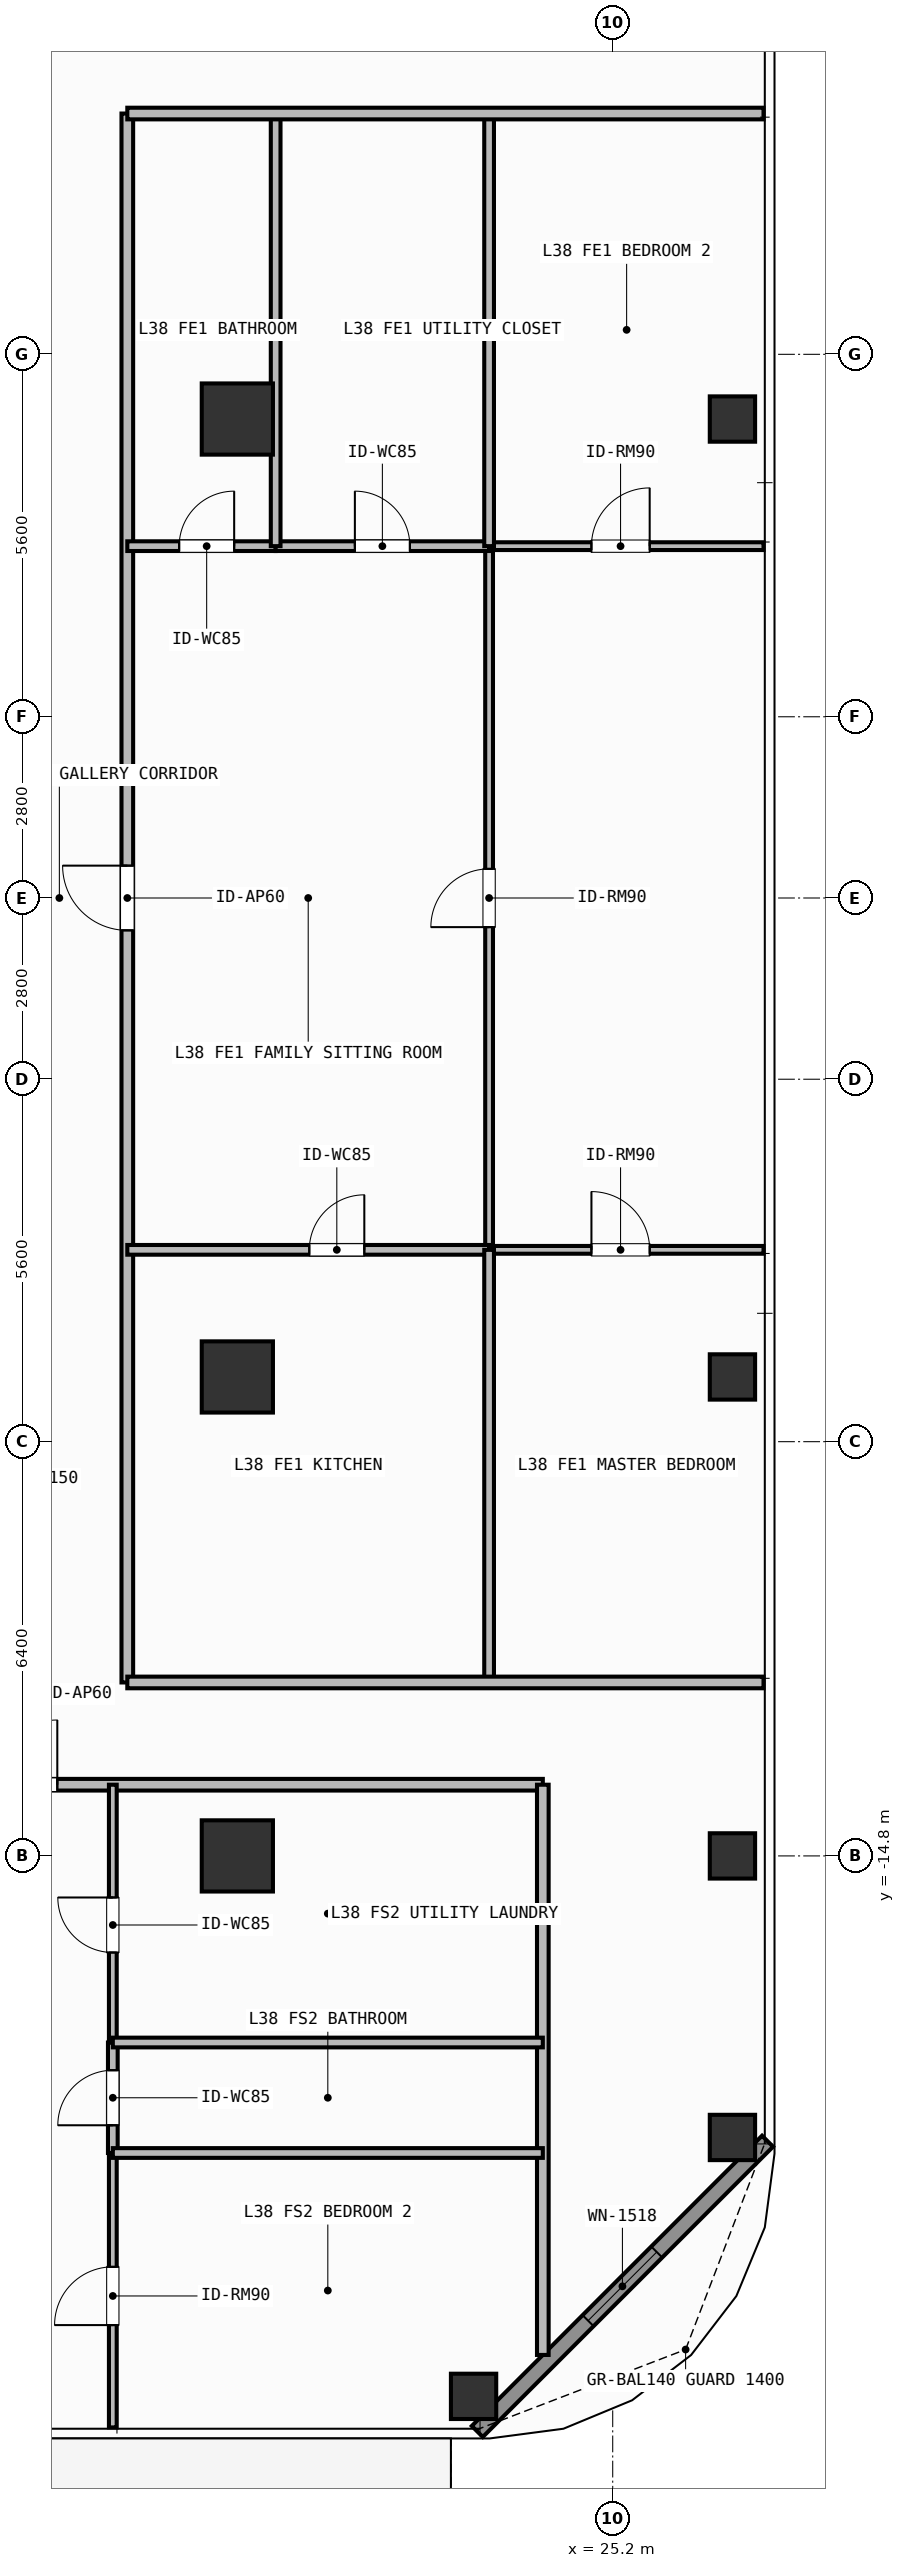
"""IFC4 building model, lengths in metres.
Left out: names, types, materials, properties, quantities, classifications, styles, units other than length and angle.
Written with IfcOpenShell. Run it as: python <this file> out.ifc"""

import sys

from ifc_helpers import new_model, si_unit, direction, frame, frame_2d, origin, origin_2d, place, context, subcontext, project, spatial, rectangle, hollow_rectangle, extrude, element, fill, save


model = new_model("IFC4")
c1 = context("Model", 3, precision=1e-05, world=origin(), true_north=direction((0.0, 1.0)))
c2 = subcontext(c1, "Body", "Model", "MODEL_VIEW")
j1 = project(units=[si_unit("LENGTHUNIT", "METRE"), si_unit("PLANEANGLEUNIT", "RADIAN")], contexts=[c1])
p1 = place(None, origin())
s1 = spatial("IfcSite", under=j1, at=p1, CompositionType="ELEMENT")
p2 = place(p1, origin())
s2 = spatial("IfcBuilding", under=s1, at=p2, CompositionType="ELEMENT")
p3 = place(p2, frame((0.0, 0.0, 152.4)))
s3 = spatial("IfcBuildingStorey", under=s2, at=p3, CompositionType="ELEMENT", Elevation=152.4)
for number, where, z_axis, x_axis in (
    (1, (19.4, -14.8, 0.0), (0.0, 0.0, 1.0), (1.0, 0.0, 0.0)),
    (2, (19.4, -7.4, 0.0), (0.0, 0.0, 1.0), (1.0, 0.0, 0.0)),
    (3, (19.4, 7.4, 0.0), (0.0, 0.0, 1.0), (1.0, 0.0, 0.0)),
):
    element("IfcColumn", number, at=place(p3, frame(where, z_axis=z_axis, x_axis=x_axis)), inside=s3, PredefinedType="COLUMN", context=c2, shape_type="SweptSolid", body=[
        extrude(rectangle(XDim=1.1, YDim=1.1, at=origin_2d()), origin(), (0.0, 0.0, 1.0), 3.9),
    ])
for number, where, z_axis, x_axis in (
    (4, (23.05, -23.15, 0.0), (0.0, 0.0, 1.0), (1.0, 0.0, 0.0)),
    (5, (27.05, -19.15, 0.0), (0.0, 0.0, 1.0), (1.0, 0.0, 0.0)),
    (6, (27.05, -14.8, 0.0), (0.0, 0.0, 1.0), (1.0, 0.0, 0.0)),
    (7, (27.05, -7.4, 0.0), (0.0, 0.0, 1.0), (1.0, 0.0, 0.0)),
    (8, (27.05, 7.4, 0.0), (0.0, 0.0, 1.0), (1.0, 0.0, 0.0)),
):
    element("IfcColumn", number, at=place(p3, frame(where, z_axis=z_axis, x_axis=x_axis)), inside=s3, PredefinedType="COLUMN", context=c2, shape_type="SweptSolid", body=[
        extrude(hollow_rectangle(XDim=0.7, YDim=0.7, WallThickness=0.032, at=origin_2d()), origin(), (0.0, 0.0, 1.0), 3.9),
    ])
p4 = place(p3, frame((27.592, -19.208, 0.0), z_axis=(0.0, 0.0, 1.0), x_axis=(-0.707087534163, -0.707126027686, 0.0)))
e9 = element("IfcWall", 9, at=p4, inside=s3, PredefinedType="SOLIDWALL", context=c2, shape_type="SweptSolid", body=[
    extrude(rectangle(XDim=6.342, YDim=0.24, at=frame_2d((3.171, 0.0))), origin(), (0.0, 0.0, 1.0), 3.6),
])
p5 = place(p4, frame((2.421, 0.0, 0.8)))
e10 = element("IfcOpeningElement", 10, at=p5, cuts=e9, PredefinedType="OPENING", context=c2, shape_type="SweptSolid", body=[
    extrude(rectangle(XDim=1.5, YDim=1.85, at=frame_2d((0.75, 0.925))), frame((0.0, 0.13, 0.0), z_axis=(0.0, -1.0, 0.0), x_axis=(1.0, 0.0, 0.0)), (0.0, 0.0, 1.0), 0.26),
])
p6 = place(p3, frame((6.326, -13.7, 0.0), z_axis=(0.0, 0.0, 1.0), x_axis=(1.0, 0.0, 0.0)))
e11 = element("IfcWall", 11, at=p6, inside=s3, PredefinedType="PARTITIONING", context=c2, shape_type="SweptSolid", body=[
    extrude(rectangle(XDim=17.794, YDim=0.18, at=frame_2d((8.897, 0.0))), origin(), (0.0, 0.0, 1.0), 3.6),
])
p7 = place(p6, frame((9.292, 0.0, 0.0)))
e12 = element("IfcOpeningElement", 12, at=p7, cuts=e11, PredefinedType="OPENING", context=c2, shape_type="SweptSolid", body=[
    extrude(rectangle(XDim=1.0, YDim=2.2, at=frame_2d((0.5, 1.1))), frame((0.0, 0.1, 0.0), z_axis=(0.0, -1.0, 0.0), x_axis=(1.0, 0.0, 0.0)), (0.0, 0.0, 1.0), 0.2),
])
p8 = place(p3, frame((17.476, -19.39, 0.0), z_axis=(0.0, 0.0, 1.0), x_axis=(0.0, 1.0, 0.0)))
e13 = element("IfcWall", 13, at=p8, inside=s3, PredefinedType="PARTITIONING", context=c2, shape_type="SweptSolid", body=[
    extrude(rectangle(XDim=1.707, YDim=0.15, at=frame_2d((0.854, 0.0))), origin(), (0.0, 0.0, 1.0), 3.6),
])
p9 = place(p8, frame((0.428, 0.0, 0.0)))
e14 = element("IfcOpeningElement", 14, at=p9, cuts=e13, PredefinedType="OPENING", context=c2, shape_type="SweptSolid", body=[
    extrude(rectangle(XDim=0.85, YDim=2.1, at=frame_2d((0.425, 1.05))), frame((0.0, 0.085, 0.0), z_axis=(0.0, -1.0, 0.0), x_axis=(1.0, 0.0, 0.0)), (0.0, 0.0, 1.0), 0.17),
])
p10 = place(p3, frame((17.476, -17.683, 0.0), z_axis=(0.0, 0.0, 1.0), x_axis=(0.0, 1.0, 0.0)))
e15 = element("IfcWall", 15, at=p10, inside=s3, PredefinedType="PARTITIONING", context=c2, shape_type="SweptSolid", body=[
    extrude(rectangle(XDim=3.983, YDim=0.12, at=frame_2d((1.992, 0.0))), origin(), (0.0, 0.0, 1.0), 3.6),
])
p11 = place(p10, frame((1.391, 0.0, 0.0)))
e16 = element("IfcOpeningElement", 16, at=p11, cuts=e15, PredefinedType="OPENING", context=c2, shape_type="SweptSolid", body=[
    extrude(rectangle(XDim=0.85, YDim=2.1, at=frame_2d((0.425, 1.05))), frame((0.0, 0.07, 0.0), z_axis=(0.0, -1.0, 0.0), x_axis=(1.0, 0.0, 0.0)), (0.0, 0.0, 1.0), 0.14),
])
p12 = place(p3, frame((17.476, -23.63, 0.0), z_axis=(0.0, 0.0, 1.0), x_axis=(0.0, 1.0, 0.0)))
e17 = element("IfcWall", 17, at=p12, inside=s3, PredefinedType="PARTITIONING", context=c2, shape_type="SweptSolid", body=[
    extrude(rectangle(XDim=4.24, YDim=0.12, at=frame_2d((2.12, 0.0))), origin(), (0.0, 0.0, 1.0), 3.6),
])
p13 = place(p12, frame((1.581, 0.0, 0.0)))
e18 = element("IfcOpeningElement", 18, at=p13, cuts=e17, PredefinedType="OPENING", context=c2, shape_type="SweptSolid", body=[
    extrude(rectangle(XDim=0.9, YDim=2.1, at=frame_2d((0.45, 1.05))), frame((0.0, 0.07, 0.0), z_axis=(0.0, -1.0, 0.0), x_axis=(1.0, 0.0, 0.0)), (0.0, 0.0, 1.0), 0.14),
])
p14 = place(p3, frame((17.7, -12.12, 0.0), z_axis=(0.0, 0.0, 1.0), x_axis=(0.0, 1.0, 0.0)))
e19 = element("IfcWall", 19, at=p14, inside=s3, PredefinedType="PARTITIONING", context=c2, shape_type="SweptSolid", body=[
    extrude(rectangle(XDim=24.24, YDim=0.18, at=frame_2d((12.12, 0.0))), origin(), (0.0, 0.0, 1.0), 3.6),
])
p15 = place(p14, frame((11.62, 0.0, 0.0)))
e20 = element("IfcOpeningElement", 20, at=p15, cuts=e19, PredefinedType="OPENING", context=c2, shape_type="SweptSolid", body=[
    extrude(rectangle(XDim=1.0, YDim=2.2, at=frame_2d((0.5, 1.1))), frame((0.0, 0.1, 0.0), z_axis=(0.0, -1.0, 0.0), x_axis=(1.0, 0.0, 0.0)), (0.0, 0.0, 1.0), 0.2),
])
p16 = place(p3, frame((23.29, -5.436, 0.0), z_axis=(0.0, 0.0, 1.0), x_axis=(0.0, 1.0, 0.0)))
e21 = element("IfcWall", 21, at=p16, inside=s3, PredefinedType="PARTITIONING", context=c2, shape_type="SweptSolid", body=[
    extrude(rectangle(XDim=10.872, YDim=0.12, at=frame_2d((5.436, 0.0))), origin(), (0.0, 0.0, 1.0), 3.6),
])
p17 = place(p16, frame((4.986, 0.0, 0.0)))
e22 = element("IfcOpeningElement", 22, at=p17, cuts=e21, PredefinedType="OPENING", context=c2, shape_type="SweptSolid", body=[
    extrude(rectangle(XDim=0.9, YDim=2.1, at=frame_2d((0.45, 1.05))), frame((0.0, 0.07, 0.0), z_axis=(0.0, -1.0, 0.0), x_axis=(1.0, 0.0, 0.0)), (0.0, 0.0, 1.0), 0.14),
])
p18 = place(p3, frame((17.7, 5.436, 0.0), z_axis=(0.0, 0.0, 1.0), x_axis=(1.0, 0.0, 0.0)))
e23 = element("IfcWall", 23, at=p18, inside=s3, PredefinedType="PARTITIONING", context=c2, shape_type="SweptSolid", body=[
    extrude(rectangle(XDim=2.292, YDim=0.15, at=frame_2d((1.146, 0.0))), origin(), (0.0, 0.0, 1.0), 3.6),
])
p19 = place(p18, frame((0.801, 0.0, 0.0)))
e24 = element("IfcOpeningElement", 24, at=p19, cuts=e23, PredefinedType="OPENING", context=c2, shape_type="SweptSolid", body=[
    extrude(rectangle(XDim=0.85, YDim=2.1, at=frame_2d((0.425, 1.05))), frame((0.0, 0.085, 0.0), z_axis=(0.0, -1.0, 0.0), x_axis=(1.0, 0.0, 0.0)), (0.0, 0.0, 1.0), 0.17),
])
p20 = place(p3, frame((19.992, 5.436, 0.0), z_axis=(0.0, 0.0, 1.0), x_axis=(1.0, 0.0, 0.0)))
e25 = element("IfcWall", 25, at=p20, inside=s3, PredefinedType="PARTITIONING", context=c2, shape_type="SweptSolid", body=[
    extrude(rectangle(XDim=3.298, YDim=0.15, at=frame_2d((1.649, 0.0))), origin(), (0.0, 0.0, 1.0), 3.6),
])
p21 = place(p20, frame((1.224, 0.0, 0.0)))
e26 = element("IfcOpeningElement", 26, at=p21, cuts=e25, PredefinedType="OPENING", context=c2, shape_type="SweptSolid", body=[
    extrude(rectangle(XDim=0.85, YDim=2.1, at=frame_2d((0.425, 1.05))), frame((0.0, 0.085, 0.0), z_axis=(0.0, -1.0, 0.0), x_axis=(1.0, 0.0, 0.0)), (0.0, 0.0, 1.0), 0.17),
])
p22 = place(p3, frame((17.7, -5.436, 0.0), z_axis=(0.0, 0.0, 1.0), x_axis=(1.0, 0.0, 0.0)))
e27 = element("IfcWall", 27, at=p22, inside=s3, PredefinedType="PARTITIONING", context=c2, shape_type="SweptSolid", body=[
    extrude(rectangle(XDim=5.59, YDim=0.15, at=frame_2d((2.795, 0.0))), origin(), (0.0, 0.0, 1.0), 3.6),
])
p23 = place(p22, frame((2.812, 0.0, 0.0)))
e28 = element("IfcOpeningElement", 28, at=p23, cuts=e27, PredefinedType="OPENING", context=c2, shape_type="SweptSolid", body=[
    extrude(rectangle(XDim=0.85, YDim=2.1, at=frame_2d((0.425, 1.05))), frame((0.0, 0.085, 0.0), z_axis=(0.0, -1.0, 0.0), x_axis=(1.0, 0.0, 0.0)), (0.0, 0.0, 1.0), 0.17),
])
p24 = place(p3, frame((23.29, -5.436, 0.0), z_axis=(0.0, 0.0, 1.0), x_axis=(1.0, 0.0, 0.0)))
e29 = element("IfcWall", 29, at=p24, inside=s3, PredefinedType="PARTITIONING", context=c2, shape_type="SweptSolid", body=[
    extrude(rectangle(XDim=4.24, YDim=0.12, at=frame_2d((2.12, 0.0))), origin(), (0.0, 0.0, 1.0), 3.6),
])
p25 = place(p24, frame((1.581, 0.0, 0.0)))
e30 = element("IfcOpeningElement", 30, at=p25, cuts=e29, PredefinedType="OPENING", context=c2, shape_type="SweptSolid", body=[
    extrude(rectangle(XDim=0.9, YDim=2.1, at=frame_2d((0.45, 1.05))), frame((0.0, 0.07, 0.0), z_axis=(0.0, -1.0, 0.0), x_axis=(1.0, 0.0, 0.0)), (0.0, 0.0, 1.0), 0.14),
])
p26 = place(p3, frame((23.29, 5.436, 0.0), z_axis=(0.0, 0.0, 1.0), x_axis=(1.0, 0.0, 0.0)))
e31 = element("IfcWall", 31, at=p26, inside=s3, PredefinedType="PARTITIONING", context=c2, shape_type="SweptSolid", body=[
    extrude(rectangle(XDim=4.24, YDim=0.12, at=frame_2d((2.12, 0.0))), origin(), (0.0, 0.0, 1.0), 3.6),
])
p27 = place(p26, frame((1.581, 0.0, 0.0)))
e32 = element("IfcOpeningElement", 32, at=p27, cuts=e31, PredefinedType="OPENING", context=c2, shape_type="SweptSolid", body=[
    extrude(rectangle(XDim=0.9, YDim=2.1, at=frame_2d((0.45, 1.05))), frame((0.0, 0.07, 0.0), z_axis=(0.0, -1.0, 0.0), x_axis=(1.0, 0.0, 0.0)), (0.0, 0.0, 1.0), 0.14),
])
p28 = place(p3, frame((24.12, -22.51, 0.0), z_axis=(0.0, 0.0, 1.0), x_axis=(0.0, 1.0, 0.0)))
e33 = element("IfcWall", 33, at=p28, inside=s3, PredefinedType="PARTITIONING", context=c2, shape_type="SweptSolid", body=[
    extrude(rectangle(XDim=8.81, YDim=0.18, at=frame_2d((4.405, 0.0))), origin(), (0.0, 0.0, 1.0), 3.6),
])
for number, where, z_axis, x_axis in (
    (34, (17.476, -17.683, 0.0), (0.0, 0.0, 1.0), (1.0, 0.0, 0.0)),
    (35, (17.476, -19.39, 0.0), (0.0, 0.0, 1.0), (1.0, 0.0, 0.0)),
):
    element("IfcWall", number, at=place(p3, frame(where, z_axis=z_axis, x_axis=x_axis)), inside=s3, PredefinedType="PARTITIONING", context=c2, shape_type="SweptSolid", body=[
        extrude(rectangle(XDim=6.644, YDim=0.15, at=frame_2d((3.322, 0.0))), origin(), (0.0, 0.0, 1.0), 3.6),
    ])
for number, where, z_axis, x_axis in (
    (36, (19.992, 5.436, 0.0), (0.0, 0.0, 1.0), (0.0, 1.0, 0.0)),
    (37, (23.29, -12.12, 0.0), (0.0, 0.0, 1.0), (0.0, 1.0, 0.0)),
    (38, (23.29, 5.436, 0.0), (0.0, 0.0, 1.0), (0.0, 1.0, 0.0)),
):
    element("IfcWall", number, at=place(p3, frame(where, z_axis=z_axis, x_axis=x_axis)), inside=s3, PredefinedType="PARTITIONING", context=c2, shape_type="SweptSolid", body=[
        extrude(rectangle(XDim=6.684, YDim=0.15, at=frame_2d((3.342, 0.0))), origin(), (0.0, 0.0, 1.0), 3.6),
    ])
for number, where, z_axis, x_axis in (
    (39, (17.7, -12.12, 0.0), (0.0, 0.0, 1.0), (1.0, 0.0, 0.0)),
    (40, (17.7, 12.12, 0.0), (0.0, 0.0, 1.0), (1.0, 0.0, 0.0)),
):
    element("IfcWall", number, at=place(p3, frame(where, z_axis=z_axis, x_axis=x_axis)), inside=s3, PredefinedType="PARTITIONING", context=c2, shape_type="SweptSolid", body=[
        extrude(rectangle(XDim=9.83, YDim=0.18, at=frame_2d((4.915, 0.0))), origin(), (0.0, 0.0, 1.0), 3.6),
    ])
p29 = place(p5, origin())
e41 = element("IfcWindow", 41, at=p29, inside=s3, PartitioningType="SINGLE_PANEL", PredefinedType="WINDOW", context=c2, shape_type="SweptSolid", body=[
    extrude(rectangle(XDim=1.5, YDim=1.85, at=frame_2d((0.75, 0.925))), frame((0.0, 0.03, 0.0), z_axis=(0.0, -1.0, 0.0), x_axis=(1.0, 0.0, 0.0)), (0.0, 0.0, 1.0), 0.06),
])
fill(e10, e41)
p30 = place(p7, origin())
e42 = element("IfcDoor", 42, at=p30, inside=s3, OperationType="SINGLE_SWING_RIGHT", PredefinedType="DOOR", context=c2, shape_type="SweptSolid", body=[
    extrude(rectangle(XDim=1.0, YDim=2.2, at=frame_2d((0.5, 1.1))), frame((0.0, 0.025, 0.0), z_axis=(0.0, -1.0, 0.0), x_axis=(1.0, 0.0, 0.0)), (0.0, 0.0, 1.0), 0.05),
])
fill(e12, e42)
p31 = place(p9, origin())
e43 = element("IfcDoor", 43, at=p31, inside=s3, OperationType="SINGLE_SWING_LEFT", PredefinedType="DOOR", context=c2, shape_type="SweptSolid", body=[
    extrude(rectangle(XDim=0.85, YDim=2.1, at=frame_2d((0.425, 1.05))), frame((0.0, 0.025, 0.0), z_axis=(0.0, -1.0, 0.0), x_axis=(1.0, 0.0, 0.0)), (0.0, 0.0, 1.0), 0.05),
])
fill(e14, e43)
p32 = place(p11, origin())
e44 = element("IfcDoor", 44, at=p32, inside=s3, OperationType="SINGLE_SWING_RIGHT", PredefinedType="DOOR", context=c2, shape_type="SweptSolid", body=[
    extrude(rectangle(XDim=0.85, YDim=2.1, at=frame_2d((0.425, 1.05))), frame((0.0, 0.025, 0.0), z_axis=(0.0, -1.0, 0.0), x_axis=(1.0, 0.0, 0.0)), (0.0, 0.0, 1.0), 0.05),
])
fill(e16, e44)
p33 = place(p13, origin())
e45 = element("IfcDoor", 45, at=p33, inside=s3, OperationType="SINGLE_SWING_LEFT", PredefinedType="DOOR", context=c2, shape_type="SweptSolid", body=[
    extrude(rectangle(XDim=0.9, YDim=2.1, at=frame_2d((0.45, 1.05))), frame((0.0, 0.025, 0.0), z_axis=(0.0, -1.0, 0.0), x_axis=(1.0, 0.0, 0.0)), (0.0, 0.0, 1.0), 0.05),
])
fill(e18, e45)
p34 = place(p15, origin())
e46 = element("IfcDoor", 46, at=p34, inside=s3, OperationType="SINGLE_SWING_RIGHT", PredefinedType="DOOR", context=c2, shape_type="SweptSolid", body=[
    extrude(rectangle(XDim=1.0, YDim=2.2, at=frame_2d((0.5, 1.1))), frame((0.0, 0.025, 0.0), z_axis=(0.0, -1.0, 0.0), x_axis=(1.0, 0.0, 0.0)), (0.0, 0.0, 1.0), 0.05),
])
fill(e20, e46)
p35 = place(p17, origin())
e47 = element("IfcDoor", 47, at=p35, inside=s3, OperationType="SINGLE_SWING_LEFT", PredefinedType="DOOR", context=c2, shape_type="SweptSolid", body=[
    extrude(rectangle(XDim=0.9, YDim=2.1, at=frame_2d((0.45, 1.05))), frame((0.0, 0.025, 0.0), z_axis=(0.0, -1.0, 0.0), x_axis=(1.0, 0.0, 0.0)), (0.0, 0.0, 1.0), 0.05),
])
fill(e22, e47)
p36 = place(p19, origin())
e48 = element("IfcDoor", 48, at=p36, inside=s3, OperationType="SINGLE_SWING_RIGHT", PredefinedType="DOOR", context=c2, shape_type="SweptSolid", body=[
    extrude(rectangle(XDim=0.85, YDim=2.1, at=frame_2d((0.425, 1.05))), frame((0.0, 0.025, 0.0), z_axis=(0.0, -1.0, 0.0), x_axis=(1.0, 0.0, 0.0)), (0.0, 0.0, 1.0), 0.05),
])
fill(e24, e48)
p37 = place(p21, origin())
e49 = element("IfcDoor", 49, at=p37, inside=s3, OperationType="SINGLE_SWING_LEFT", PredefinedType="DOOR", context=c2, shape_type="SweptSolid", body=[
    extrude(rectangle(XDim=0.85, YDim=2.1, at=frame_2d((0.425, 1.05))), frame((0.0, 0.025, 0.0), z_axis=(0.0, -1.0, 0.0), x_axis=(1.0, 0.0, 0.0)), (0.0, 0.0, 1.0), 0.05),
])
fill(e26, e49)
p38 = place(p23, origin())
e50 = element("IfcDoor", 50, at=p38, inside=s3, OperationType="SINGLE_SWING_RIGHT", PredefinedType="DOOR", context=c2, shape_type="SweptSolid", body=[
    extrude(rectangle(XDim=0.85, YDim=2.1, at=frame_2d((0.425, 1.05))), frame((0.0, 0.025, 0.0), z_axis=(0.0, -1.0, 0.0), x_axis=(1.0, 0.0, 0.0)), (0.0, 0.0, 1.0), 0.05),
])
fill(e28, e50)
p39 = place(p25, origin())
e51 = element("IfcDoor", 51, at=p39, inside=s3, OperationType="SINGLE_SWING_LEFT", PredefinedType="DOOR", context=c2, shape_type="SweptSolid", body=[
    extrude(rectangle(XDim=0.9, YDim=2.1, at=frame_2d((0.45, 1.05))), frame((0.0, 0.025, 0.0), z_axis=(0.0, -1.0, 0.0), x_axis=(1.0, 0.0, 0.0)), (0.0, 0.0, 1.0), 0.05),
])
fill(e30, e51)
p40 = place(p27, origin())
e52 = element("IfcDoor", 52, at=p40, inside=s3, OperationType="SINGLE_SWING_RIGHT", PredefinedType="DOOR", context=c2, shape_type="SweptSolid", body=[
    extrude(rectangle(XDim=0.9, YDim=2.1, at=frame_2d((0.45, 1.05))), frame((0.0, 0.025, 0.0), z_axis=(0.0, -1.0, 0.0), x_axis=(1.0, 0.0, 0.0)), (0.0, 0.0, 1.0), 0.05),
])
fill(e32, e52)
save(model, sys.argv[1])
